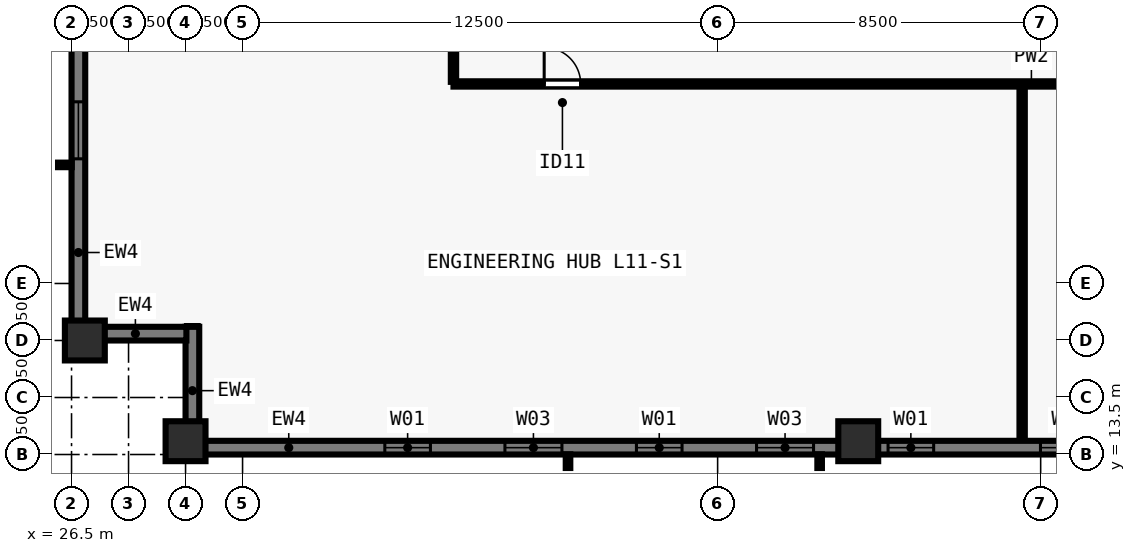
"""IFC4 building model, lengths in metres.
Left out: names, types, materials, properties, quantities, classifications, styles, units other than length and angle.
Written with IfcOpenShell. Run it as: python <this file> out.ifc"""

import sys

from ifc_helpers import new_model, si_unit, direction, frame, frame_2d, origin, origin_2d, place, context, subcontext, project, spatial, rectangle, extrude, element, fill, save


model = new_model("IFC4")
c1 = context("Model", 3, precision=1e-05, world=origin(), true_north=direction((0.0, 1.0)))
c2 = subcontext(c1, "Body", "Model", "MODEL_VIEW")
j1 = project(units=[si_unit("LENGTHUNIT", "METRE"), si_unit("PLANEANGLEUNIT", "RADIAN")], contexts=[c1])
p1 = place(None, origin())
s1 = spatial("IfcSite", under=j1, at=p1, CompositionType="ELEMENT")
p2 = place(p1, origin())
s2 = spatial("IfcBuilding", under=s1, at=p2, CompositionType="ELEMENT")
p3 = place(p2, frame((0.0, 0.0, 44.5)))
s3 = spatial("IfcBuildingStorey", under=s2, at=p3, CompositionType="ELEMENT", Elevation=44.5)
for number, where, z_axis, x_axis in (
    (1, (29.5, 13.85, 0.0), (0.0, 0.0, 1.0), (1.0, 0.0, 0.0)),
    (2, (47.2, 13.85, 0.0), (0.0, 0.0, 1.0), (1.0, 0.0, 0.0)),
    (3, (26.85, 16.5, 0.0), (0.0, 0.0, 1.0), (0.0, 1.0, 0.0)),
):
    element("IfcColumn", number, at=place(p3, frame(where, z_axis=z_axis, x_axis=x_axis)), inside=s3, PredefinedType="COLUMN", context=c2, shape_type="SweptSolid", body=[
        extrude(rectangle(XDim=1.05, YDim=1.05, at=origin_2d()), origin(), (0.0, 0.0, 1.0), 3.5),
    ])
p4 = place(p3, frame((57.4, 13.68, 0.0), z_axis=(0.0, 0.0, 1.0), x_axis=(-1.0, 0.0, 0.0)))
e4 = element("IfcWall", 4, at=p4, inside=s3, PredefinedType="SOLIDWALL", context=c2, shape_type="SweptSolid", body=[
    extrude(rectangle(XDim=27.562, YDim=0.36, at=frame_2d((13.781, 0.0))), origin(), (0.0, 0.0, 1.0), 3.28),
])
p5 = place(p4, frame((3.905, 0.0, 0.8)))
e5 = element("IfcOpeningElement", 5, at=p5, cuts=e4, PredefinedType="OPENING", context=c2, shape_type="SweptSolid", body=[
    extrude(rectangle(XDim=1.5, YDim=1.544, at=frame_2d((0.75, 0.772))), frame((0.0, 0.19, 0.0), z_axis=(0.0, -1.0, 0.0), x_axis=(1.0, 0.0, 0.0)), (0.0, 0.0, 1.0), 0.38),
])
p6 = place(p4, frame((8.216, 0.0, 0.8)))
e6 = element("IfcOpeningElement", 6, at=p6, cuts=e4, PredefinedType="OPENING", context=c2, shape_type="SweptSolid", body=[
    extrude(rectangle(XDim=1.2, YDim=1.544, at=frame_2d((0.6, 0.772))), frame((0.0, 0.19, 0.0), z_axis=(0.0, -1.0, 0.0), x_axis=(1.0, 0.0, 0.0)), (0.0, 0.0, 1.0), 0.38),
])
p7 = place(p4, frame((11.376, 0.0, 0.8)))
e7 = element("IfcOpeningElement", 7, at=p7, cuts=e4, PredefinedType="OPENING", context=c2, shape_type="SweptSolid", body=[
    extrude(rectangle(XDim=1.5, YDim=1.544, at=frame_2d((0.75, 0.772))), frame((0.0, 0.19, 0.0), z_axis=(0.0, -1.0, 0.0), x_axis=(1.0, 0.0, 0.0)), (0.0, 0.0, 1.0), 0.38),
])
p8 = place(p4, frame((14.836, 0.0, 0.8)))
e8 = element("IfcOpeningElement", 8, at=p8, cuts=e4, PredefinedType="OPENING", context=c2, shape_type="SweptSolid", body=[
    extrude(rectangle(XDim=1.2, YDim=1.544, at=frame_2d((0.6, 0.772))), frame((0.0, 0.19, 0.0), z_axis=(0.0, -1.0, 0.0), x_axis=(1.0, 0.0, 0.0)), (0.0, 0.0, 1.0), 0.38),
])
p9 = place(p4, frame((17.997, 0.0, 0.8)))
e9 = element("IfcOpeningElement", 9, at=p9, cuts=e4, PredefinedType="OPENING", context=c2, shape_type="SweptSolid", body=[
    extrude(rectangle(XDim=1.5, YDim=1.544, at=frame_2d((0.75, 0.772))), frame((0.0, 0.19, 0.0), z_axis=(0.0, -1.0, 0.0), x_axis=(1.0, 0.0, 0.0)), (0.0, 0.0, 1.0), 0.38),
])
p10 = place(p4, frame((21.457, 0.0, 0.8)))
e10 = element("IfcOpeningElement", 10, at=p10, cuts=e4, PredefinedType="OPENING", context=c2, shape_type="SweptSolid", body=[
    extrude(rectangle(XDim=1.2, YDim=1.544, at=frame_2d((0.6, 0.772))), frame((0.0, 0.19, 0.0), z_axis=(0.0, -1.0, 0.0), x_axis=(1.0, 0.0, 0.0)), (0.0, 0.0, 1.0), 0.38),
])
p11 = place(p3, frame((29.68, 13.5, 0.0), z_axis=(0.0, 0.0, 1.0), x_axis=(0.0, 1.0, 0.0)))
e11 = element("IfcWall", 11, at=p11, inside=s3, PredefinedType="SOLIDWALL", context=c2, shape_type="SweptSolid", body=[
    extrude(rectangle(XDim=3.36, YDim=0.36, at=frame_2d((1.68, 0.0))), origin(), (0.0, 0.0, 1.0), 3.28),
])
p12 = place(p3, frame((29.522, 16.68, 0.0), z_axis=(0.0, 0.0, 1.0), x_axis=(-1.0, 0.0, 0.0)))
e12 = element("IfcWall", 12, at=p12, inside=s3, PredefinedType="SOLIDWALL", context=c2, shape_type="SweptSolid", body=[
    extrude(rectangle(XDim=2.684, YDim=0.36, at=frame_2d((1.342, 0.0))), origin(), (0.0, 0.0, 1.0), 3.28),
])
p13 = place(p3, frame((26.68, 16.5, 0.0), z_axis=(0.0, 0.0, 1.0), x_axis=(0.0, 1.0, 0.0)))
e13 = element("IfcWall", 13, at=p13, inside=s3, PredefinedType="SOLIDWALL", context=c2, shape_type="SweptSolid", body=[
    extrude(rectangle(XDim=44.662, YDim=0.36, at=frame_2d((22.331, 0.0))), origin(), (0.0, 0.0, 1.0), 3.28),
])
p14 = place(p13, frame((4.78, 0.0, 0.8)))
e14 = element("IfcOpeningElement", 14, at=p14, cuts=e13, PredefinedType="OPENING", context=c2, shape_type="SweptSolid", body=[
    extrude(rectangle(XDim=1.5, YDim=1.544, at=frame_2d((0.75, 0.772))), frame((0.0, 0.19, 0.0), z_axis=(0.0, -1.0, 0.0), x_axis=(1.0, 0.0, 0.0)), (0.0, 0.0, 1.0), 0.38),
])
p15 = place(p13, frame((8.29, 0.0, 0.8)))
e15 = element("IfcOpeningElement", 15, at=p15, cuts=e13, PredefinedType="OPENING", context=c2, shape_type="SweptSolid", body=[
    extrude(rectangle(XDim=1.2, YDim=1.544, at=frame_2d((0.6, 0.772))), frame((0.0, 0.19, 0.0), z_axis=(0.0, -1.0, 0.0), x_axis=(1.0, 0.0, 0.0)), (0.0, 0.0, 1.0), 0.38),
])
p16 = place(p13, frame((11.5, 0.0, 0.8)))
e16 = element("IfcOpeningElement", 16, at=p16, cuts=e13, PredefinedType="OPENING", context=c2, shape_type="SweptSolid", body=[
    extrude(rectangle(XDim=1.5, YDim=1.544, at=frame_2d((0.75, 0.772))), frame((0.0, 0.19, 0.0), z_axis=(0.0, -1.0, 0.0), x_axis=(1.0, 0.0, 0.0)), (0.0, 0.0, 1.0), 0.38),
])
p17 = place(p13, frame((15.01, 0.0, 0.8)))
e17 = element("IfcOpeningElement", 17, at=p17, cuts=e13, PredefinedType="OPENING", context=c2, shape_type="SweptSolid", body=[
    extrude(rectangle(XDim=1.2, YDim=1.544, at=frame_2d((0.6, 0.772))), frame((0.0, 0.19, 0.0), z_axis=(0.0, -1.0, 0.0), x_axis=(1.0, 0.0, 0.0)), (0.0, 0.0, 1.0), 0.38),
])
p18 = place(p13, frame((18.671, 0.0, 0.8)))
e18 = element("IfcOpeningElement", 18, at=p18, cuts=e13, PredefinedType="OPENING", context=c2, shape_type="SweptSolid", body=[
    extrude(rectangle(XDim=1.5, YDim=1.544, at=frame_2d((0.75, 0.772))), frame((0.0, 0.19, 0.0), z_axis=(0.0, -1.0, 0.0), x_axis=(1.0, 0.0, 0.0)), (0.0, 0.0, 1.0), 0.38),
])
p19 = place(p13, frame((20.881, 0.0, 0.8)))
e19 = element("IfcOpeningElement", 19, at=p19, cuts=e13, PredefinedType="OPENING", context=c2, shape_type="SweptSolid", body=[
    extrude(rectangle(XDim=1.2, YDim=1.544, at=frame_2d((0.6, 0.772))), frame((0.0, 0.19, 0.0), z_axis=(0.0, -1.0, 0.0), x_axis=(1.0, 0.0, 0.0)), (0.0, 0.0, 1.0), 0.38),
])
p20 = place(p13, frame((24.941, 0.0, 0.8)))
e20 = element("IfcOpeningElement", 20, at=p20, cuts=e13, PredefinedType="OPENING", context=c2, shape_type="SweptSolid", body=[
    extrude(rectangle(XDim=1.5, YDim=1.544, at=frame_2d((0.75, 0.772))), frame((0.0, 0.19, 0.0), z_axis=(0.0, -1.0, 0.0), x_axis=(1.0, 0.0, 0.0)), (0.0, 0.0, 1.0), 0.38),
])
p21 = place(p13, frame((28.451, 0.0, 0.8)))
e21 = element("IfcOpeningElement", 21, at=p21, cuts=e13, PredefinedType="OPENING", context=c2, shape_type="SweptSolid", body=[
    extrude(rectangle(XDim=1.2, YDim=1.544, at=frame_2d((0.6, 0.772))), frame((0.0, 0.19, 0.0), z_axis=(0.0, -1.0, 0.0), x_axis=(1.0, 0.0, 0.0)), (0.0, 0.0, 1.0), 0.38),
])
p22 = place(p13, frame((31.662, 0.0, 0.8)))
e22 = element("IfcOpeningElement", 22, at=p22, cuts=e13, PredefinedType="OPENING", context=c2, shape_type="SweptSolid", body=[
    extrude(rectangle(XDim=1.5, YDim=1.544, at=frame_2d((0.75, 0.772))), frame((0.0, 0.19, 0.0), z_axis=(0.0, -1.0, 0.0), x_axis=(1.0, 0.0, 0.0)), (0.0, 0.0, 1.0), 0.38),
])
p23 = place(p13, frame((35.172, 0.0, 0.8)))
e23 = element("IfcOpeningElement", 23, at=p23, cuts=e13, PredefinedType="OPENING", context=c2, shape_type="SweptSolid", body=[
    extrude(rectangle(XDim=1.2, YDim=1.544, at=frame_2d((0.6, 0.772))), frame((0.0, 0.19, 0.0), z_axis=(0.0, -1.0, 0.0), x_axis=(1.0, 0.0, 0.0)), (0.0, 0.0, 1.0), 0.38),
])
p24 = place(p13, frame((38.382, 0.0, 0.8)))
e24 = element("IfcOpeningElement", 24, at=p24, cuts=e13, PredefinedType="OPENING", context=c2, shape_type="SweptSolid", body=[
    extrude(rectangle(XDim=1.5, YDim=1.544, at=frame_2d((0.75, 0.772))), frame((0.0, 0.19, 0.0), z_axis=(0.0, -1.0, 0.0), x_axis=(1.0, 0.0, 0.0)), (0.0, 0.0, 1.0), 0.38),
])
p25 = place(p3, frame((36.55, 23.25, 0.0), z_axis=(0.0, 0.0, 1.0), x_axis=(1.0, 0.0, 0.0)))
e25 = element("IfcWall", 25, at=p25, inside=s3, PredefinedType="PARTITIONING", context=c2, shape_type="SweptSolid", body=[
    extrude(rectangle(XDim=30.9, YDim=0.14, at=frame_2d((15.45, 0.0))), origin(), (0.0, 0.0, 1.0), 3.28),
])
p26 = place(p25, frame((2.386, 0.0, 0.0)))
e26 = element("IfcOpeningElement", 26, at=p26, cuts=e25, PredefinedType="OPENING", context=c2, shape_type="SweptSolid", body=[
    extrude(rectangle(XDim=0.96, YDim=2.12, at=frame_2d((0.48, 1.06))), frame((0.0, 0.08, 0.0), z_axis=(0.0, -1.0, 0.0), x_axis=(1.0, 0.0, 0.0)), (0.0, 0.0, 1.0), 0.16),
])
p27 = place(p25, frame((27.066, 0.0, 0.0)))
e27 = element("IfcOpeningElement", 27, at=p27, cuts=e25, PredefinedType="OPENING", context=c2, shape_type="SweptSolid", body=[
    extrude(rectangle(XDim=0.96, YDim=2.12, at=frame_2d((0.48, 1.06))), frame((0.0, 0.08, 0.0), z_axis=(0.0, -1.0, 0.0), x_axis=(1.0, 0.0, 0.0)), (0.0, 0.0, 1.0), 0.16),
])
p28 = place(p3, frame((36.55, 23.305, 0.0), z_axis=(0.0, 0.0, 1.0), x_axis=(0.0, 1.0, 0.0)))
e28 = element("IfcWall", 28, at=p28, inside=s3, PredefinedType="PARTITIONING", context=c2, shape_type="SweptSolid", body=[
    extrude(rectangle(XDim=31.39, YDim=0.14, at=frame_2d((15.695, 0.0))), origin(), (0.0, 0.0, 1.0), 3.28),
])
p29 = place(p28, frame((3.307, 0.0, 0.0)))
e29 = element("IfcOpeningElement", 29, at=p29, cuts=e28, PredefinedType="OPENING", context=c2, shape_type="SweptSolid", body=[
    extrude(rectangle(XDim=0.96, YDim=2.12, at=frame_2d((0.48, 1.06))), frame((0.0, 0.08, 0.0), z_axis=(0.0, -1.0, 0.0), x_axis=(1.0, 0.0, 0.0)), (0.0, 0.0, 1.0), 0.16),
])
p30 = place(p28, frame((11.25, 0.0, 0.0)))
e30 = element("IfcOpeningElement", 30, at=p30, cuts=e28, PredefinedType="OPENING", context=c2, shape_type="SweptSolid", body=[
    extrude(rectangle(XDim=0.96, YDim=2.12, at=frame_2d((0.48, 1.06))), frame((0.0, 0.08, 0.0), z_axis=(0.0, -1.0, 0.0), x_axis=(1.0, 0.0, 0.0)), (0.0, 0.0, 1.0), 0.16),
])
p31 = place(p28, frame((19.075, 0.0, 0.0)))
e31 = element("IfcOpeningElement", 31, at=p31, cuts=e28, PredefinedType="OPENING", context=c2, shape_type="SweptSolid", body=[
    extrude(rectangle(XDim=0.96, YDim=2.12, at=frame_2d((0.48, 1.06))), frame((0.0, 0.08, 0.0), z_axis=(0.0, -1.0, 0.0), x_axis=(1.0, 0.0, 0.0)), (0.0, 0.0, 1.0), 0.16),
])
p32 = place(p28, frame((26.782, 0.0, 0.0)))
e32 = element("IfcOpeningElement", 32, at=p32, cuts=e28, PredefinedType="OPENING", context=c2, shape_type="SweptSolid", body=[
    extrude(rectangle(XDim=0.96, YDim=2.12, at=frame_2d((0.48, 1.06))), frame((0.0, 0.08, 0.0), z_axis=(0.0, -1.0, 0.0), x_axis=(1.0, 0.0, 0.0)), (0.0, 0.0, 1.0), 0.16),
])
p33 = place(p3, frame((51.512, 13.92, 0.0), z_axis=(0.0, 0.0, 1.0), x_axis=(0.0, 1.0, 0.0)))
e33 = element("IfcWall", 33, at=p33, inside=s3, PredefinedType="PARTITIONING", context=c2, shape_type="SweptSolid", body=[
    extrude(rectangle(XDim=9.23, YDim=0.14, at=frame_2d((4.615, 0.0))), origin(), (0.0, 0.0, 1.0), 2.849),
])
p34 = place(p5, origin())
e34 = element("IfcWindow", 34, at=p34, inside=s3, PartitioningType="SINGLE_PANEL", PredefinedType="WINDOW", context=c2, shape_type="SweptSolid", body=[
    extrude(rectangle(XDim=1.5, YDim=1.544, at=frame_2d((0.75, 0.772))), frame((0.0, -0.05, 0.0), z_axis=(0.0, -1.0, 0.0), x_axis=(1.0, 0.0, 0.0)), (0.0, 0.0, 1.0), 0.06),
])
fill(e5, e34)
p35 = place(p6, origin())
e35 = element("IfcWindow", 35, at=p35, inside=s3, PartitioningType="SINGLE_PANEL", PredefinedType="WINDOW", context=c2, shape_type="SweptSolid", body=[
    extrude(rectangle(XDim=1.2, YDim=1.544, at=frame_2d((0.6, 0.772))), frame((0.0, -0.05, 0.0), z_axis=(0.0, -1.0, 0.0), x_axis=(1.0, 0.0, 0.0)), (0.0, 0.0, 1.0), 0.06),
])
fill(e6, e35)
p36 = place(p7, origin())
e36 = element("IfcWindow", 36, at=p36, inside=s3, PartitioningType="SINGLE_PANEL", PredefinedType="WINDOW", context=c2, shape_type="SweptSolid", body=[
    extrude(rectangle(XDim=1.5, YDim=1.544, at=frame_2d((0.75, 0.772))), frame((0.0, -0.05, 0.0), z_axis=(0.0, -1.0, 0.0), x_axis=(1.0, 0.0, 0.0)), (0.0, 0.0, 1.0), 0.06),
])
fill(e7, e36)
p37 = place(p8, origin())
e37 = element("IfcWindow", 37, at=p37, inside=s3, PartitioningType="SINGLE_PANEL", PredefinedType="WINDOW", context=c2, shape_type="SweptSolid", body=[
    extrude(rectangle(XDim=1.2, YDim=1.544, at=frame_2d((0.6, 0.772))), frame((0.0, -0.05, 0.0), z_axis=(0.0, -1.0, 0.0), x_axis=(1.0, 0.0, 0.0)), (0.0, 0.0, 1.0), 0.06),
])
fill(e8, e37)
p38 = place(p9, origin())
e38 = element("IfcWindow", 38, at=p38, inside=s3, PartitioningType="SINGLE_PANEL", PredefinedType="WINDOW", context=c2, shape_type="SweptSolid", body=[
    extrude(rectangle(XDim=1.5, YDim=1.544, at=frame_2d((0.75, 0.772))), frame((0.0, -0.05, 0.0), z_axis=(0.0, -1.0, 0.0), x_axis=(1.0, 0.0, 0.0)), (0.0, 0.0, 1.0), 0.06),
])
fill(e9, e38)
p39 = place(p10, origin())
e39 = element("IfcWindow", 39, at=p39, inside=s3, PartitioningType="SINGLE_PANEL", PredefinedType="WINDOW", context=c2, shape_type="SweptSolid", body=[
    extrude(rectangle(XDim=1.2, YDim=1.544, at=frame_2d((0.6, 0.772))), frame((0.0, -0.05, 0.0), z_axis=(0.0, -1.0, 0.0), x_axis=(1.0, 0.0, 0.0)), (0.0, 0.0, 1.0), 0.06),
])
fill(e10, e39)
p40 = place(p14, origin())
e40 = element("IfcWindow", 40, at=p40, inside=s3, PartitioningType="SINGLE_PANEL", PredefinedType="WINDOW", context=c2, shape_type="SweptSolid", body=[
    extrude(rectangle(XDim=1.5, YDim=1.544, at=frame_2d((0.75, 0.772))), frame((0.0, -0.05, 0.0), z_axis=(0.0, -1.0, 0.0), x_axis=(1.0, 0.0, 0.0)), (0.0, 0.0, 1.0), 0.06),
])
fill(e14, e40)
p41 = place(p26, origin())
e41 = element("IfcDoor", 41, at=p41, inside=s3, OperationType="SINGLE_SWING_LEFT", PredefinedType="DOOR", context=c2, shape_type="SweptSolid", body=[
    extrude(rectangle(XDim=0.96, YDim=2.12, at=frame_2d((0.48, 1.06))), frame((0.0, 0.025, 0.0), z_axis=(0.0, -1.0, 0.0), x_axis=(1.0, 0.0, 0.0)), (0.0, 0.0, 1.0), 0.05),
])
fill(e26, e41)
save(model, sys.argv[1])
